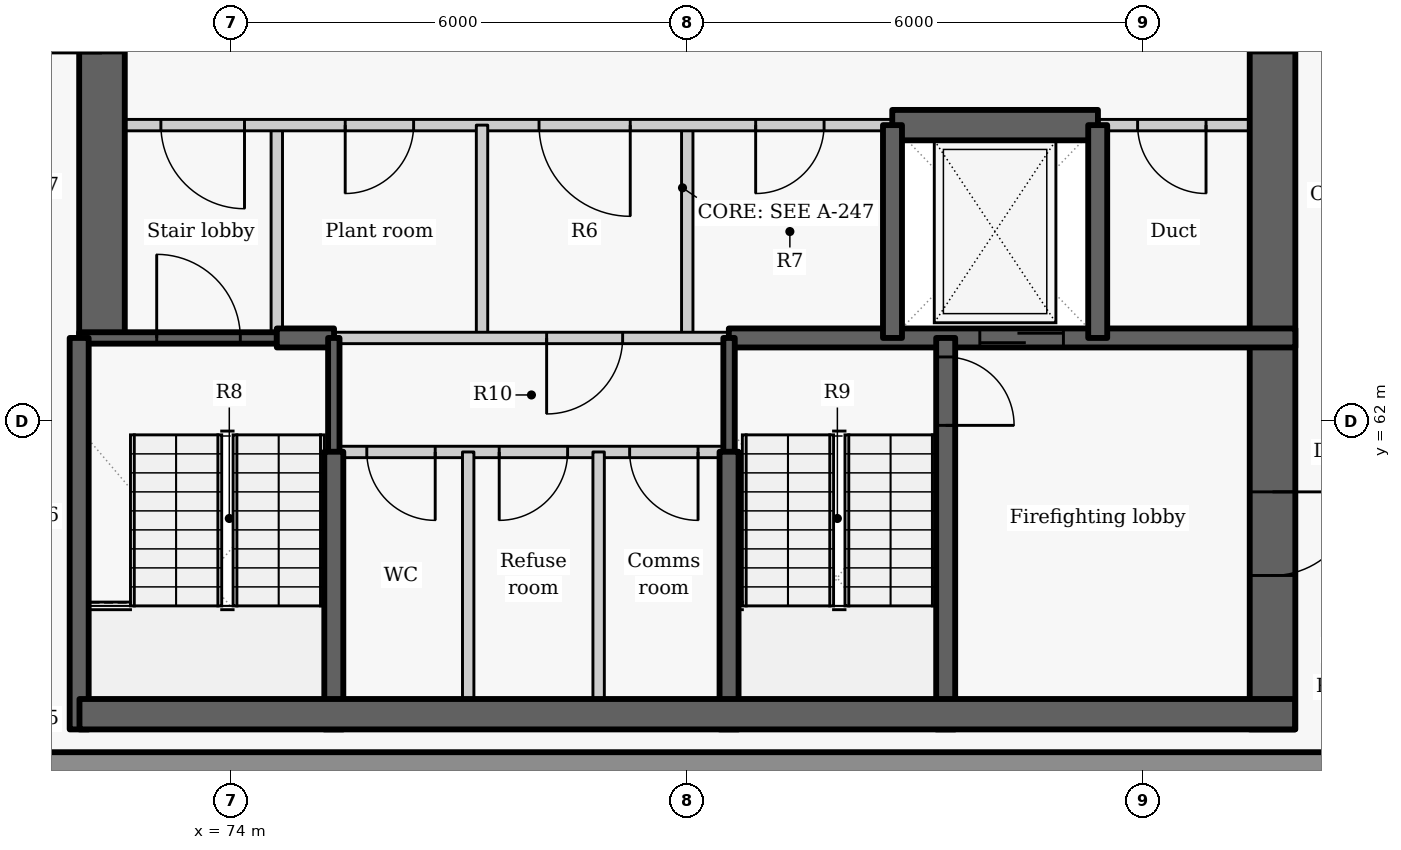
"""IFC4 building model, lengths in metres.
Left out: names, types, materials, properties, quantities, classifications, styles, units other than length and angle.
Written with IfcOpenShell. Run it as: python <this file> out.ifc"""

import sys

from ifc_helpers import new_model, si_unit, direction, frame, frame_2d, origin, place, context, subcontext, project, spatial, rectangle, extrude, element, fill, save


model = new_model("IFC4")
c1 = context("Model", 3, precision=1e-05, world=origin(), true_north=direction((0.0, 1.0)))
c2 = subcontext(c1, "Body", "Model", "MODEL_VIEW")
j1 = project(units=[si_unit("LENGTHUNIT", "METRE"), si_unit("PLANEANGLEUNIT", "RADIAN")], contexts=[c1])
p1 = place(None, origin())
s1 = spatial("IfcSite", under=j1, at=p1, CompositionType="ELEMENT")
p2 = place(p1, origin())
s2 = spatial("IfcBuilding", under=s1, at=p2, CompositionType="ELEMENT")
p3 = place(p2, frame((0.0, 0.0, 279.6)))
s3 = spatial("IfcBuildingStorey", under=s2, at=p3, CompositionType="ELEMENT", Elevation=279.6)
p4 = place(p3, frame((70.451, 57.5, 0.0), z_axis=(0.0, 0.0, 1.0), x_axis=(1.0, 0.0, 0.0)))
e1 = element("IfcWall", 1, at=p4, inside=s3, PredefinedType="SOLIDWALL", context=c2, shape_type="SweptSolid", body=[
    extrude(rectangle(XDim=19.093, YDim=0.3, at=frame_2d((9.546, 0.0))), origin(), (0.0, 0.0, 1.0), 2.725),
])
p5 = place(p3, frame((74.6, 63.1, 0.0), z_axis=(0.0, 0.0, 1.0), x_axis=(0.0, 1.0, 0.0)))
e2 = element("IfcWall", 2, at=p5, inside=s3, PredefinedType="PARTITIONING", context=c2, shape_type="SweptSolid", body=[
    extrude(rectangle(XDim=2.8, YDim=0.15, at=frame_2d((1.4, 0.0))), origin(), (0.0, 0.0, 1.0), 3.325),
])
p6 = place(p3, frame((72.3, 63.1, -0.275), z_axis=(0.0, 0.0, 1.0), x_axis=(0.0, 1.0, 0.0)))
e3 = element("IfcWall", 3, at=p6, inside=s3, PredefinedType="SHEAR", context=c2, shape_type="SweptSolid", body=[
    extrude(rectangle(XDim=9.1, YDim=0.6, at=frame_2d((4.55, 0.0))), origin(), (0.0, 0.0, 1.0), 3.6),
])
p7 = place(p6, frame((3.75, 0.0, 0.275)))
e4 = element("IfcOpeningElement", 4, at=p7, cuts=e3, PredefinedType="OPENING", context=c2, shape_type="SweptSolid", body=[
    extrude(rectangle(XDim=1.5, YDim=2.1, at=frame_2d((0.75, 1.05))), frame((0.0, 0.31, 0.0), z_axis=(0.0, -1.0, 0.0), x_axis=(1.0, 0.0, 0.0)), (0.0, 0.0, 1.0), 0.62),
])
p8 = place(p3, frame((80.0, 63.1, 0.0), z_axis=(0.0, 0.0, 1.0), x_axis=(0.0, 1.0, 0.0)))
e5 = element("IfcWall", 5, at=p8, inside=s3, PredefinedType="PARTITIONING", context=c2, shape_type="SweptSolid", body=[
    extrude(rectangle(XDim=2.8, YDim=0.15, at=frame_2d((1.4, 0.0))), origin(), (0.0, 0.0, 1.0), 3.325),
])
p9 = place(p3, frame((82.703, 65.9, 0.0), z_axis=(0.0, 0.0, 1.0), x_axis=(-1.0, 0.0, 0.0)))
e6 = element("IfcWall", 6, at=p9, inside=s3, PredefinedType="PARTITIONING", context=c2, shape_type="SweptSolid", body=[
    extrude(rectangle(XDim=10.703, YDim=0.15, at=frame_2d((5.352, 0.0))), origin(), (0.0, 0.0, 1.0), 3.325),
])
p10 = place(p9, frame((8.528, 0.0, 0.0)))
e7 = element("IfcOpeningElement", 7, at=p10, cuts=e6, PredefinedType="OPENING", context=c2, shape_type="SweptSolid", body=[
    extrude(rectangle(XDim=1.1, YDim=2.1, at=frame_2d((0.55, 1.05))), frame((0.0, 0.085, 0.0), z_axis=(0.0, -1.0, 0.0), x_axis=(1.0, 0.0, 0.0)), (0.0, 0.0, 1.0), 0.17),
])
p11 = place(p9, frame((6.303, 0.0, 0.0)))
e8 = element("IfcOpeningElement", 8, at=p11, cuts=e6, PredefinedType="OPENING", context=c2, shape_type="SweptSolid", body=[
    extrude(rectangle(XDim=0.9, YDim=2.1, at=frame_2d((0.45, 1.05))), frame((0.0, 0.085, 0.0), z_axis=(0.0, -1.0, 0.0), x_axis=(1.0, 0.0, 0.0)), (0.0, 0.0, 1.0), 0.17),
])
p12 = place(p9, frame((3.453, 0.0, 0.0)))
e9 = element("IfcOpeningElement", 9, at=p12, cuts=e6, PredefinedType="OPENING", context=c2, shape_type="SweptSolid", body=[
    extrude(rectangle(XDim=1.2, YDim=2.1, at=frame_2d((0.6, 1.05))), frame((0.0, 0.085, 0.0), z_axis=(0.0, -1.0, 0.0), x_axis=(1.0, 0.0, 0.0)), (0.0, 0.0, 1.0), 0.17),
])
p13 = place(p9, frame((0.903, 0.0, 0.0)))
e10 = element("IfcOpeningElement", 10, at=p13, cuts=e6, PredefinedType="OPENING", context=c2, shape_type="SweptSolid", body=[
    extrude(rectangle(XDim=0.9, YDim=2.1, at=frame_2d((0.45, 1.05))), frame((0.0, 0.085, 0.0), z_axis=(0.0, -1.0, 0.0), x_axis=(1.0, 0.0, 0.0)), (0.0, 0.0, 1.0), 0.17),
])
p14 = place(p3, frame((88.0, 65.9, 0.0), z_axis=(0.0, 0.0, 1.0), x_axis=(-1.0, 0.0, 0.0)))
e11 = element("IfcWall", 11, at=p14, inside=s3, PredefinedType="PARTITIONING", context=c2, shape_type="SweptSolid", body=[
    extrude(rectangle(XDim=2.603, YDim=0.15, at=frame_2d((1.302, 0.0))), origin(), (0.0, 0.0, 1.0), 3.325),
])
p15 = place(p14, frame((1.175, 0.0, 0.0)))
e12 = element("IfcOpeningElement", 12, at=p15, cuts=e11, PredefinedType="OPENING", context=c2, shape_type="SweptSolid", body=[
    extrude(rectangle(XDim=0.9, YDim=2.1, at=frame_2d((0.45, 1.05))), frame((0.0, 0.085, 0.0), z_axis=(0.0, -1.0, 0.0), x_axis=(1.0, 0.0, 0.0)), (0.0, 0.0, 1.0), 0.17),
])
p16 = place(p3, frame((82.697, 65.9, -0.275), z_axis=(0.0, 0.0, 1.0), x_axis=(1.0, 0.0, 0.0)))
e13 = element("IfcWall", 13, at=p16, inside=s3, PredefinedType="SHEAR", context=c2, shape_type="SweptSolid", body=[
    extrude(rectangle(XDim=2.706, YDim=0.4, at=frame_2d((1.353, 0.0))), origin(), (0.0, 0.0, 1.0), 3.6),
])
p17 = place(p3, frame((87.7, 69.3, -0.275), z_axis=(0.0, 0.0, 1.0), x_axis=(0.0, -1.0, 0.0)))
e14 = element("IfcWall", 14, at=p17, inside=s3, PredefinedType="SHEAR", context=c2, shape_type="SweptSolid", body=[
    extrude(rectangle(XDim=11.35, YDim=0.6, at=frame_2d((5.675, 0.0))), origin(), (0.0, 0.0, 1.0), 3.6),
])
p18 = place(p17, frame((0.95, 0.0, 0.275)))
e15 = element("IfcOpeningElement", 15, at=p18, cuts=e14, PredefinedType="OPENING", context=c2, shape_type="SweptSolid", body=[
    extrude(rectangle(XDim=1.5, YDim=2.1, at=frame_2d((0.75, 1.05))), frame((0.0, 0.31, 0.0), z_axis=(0.0, -1.0, 0.0), x_axis=(1.0, 0.0, 0.0)), (0.0, 0.0, 1.0), 0.62),
])
p19 = place(p17, frame((8.225, 0.0, 0.275)))
e16 = element("IfcOpeningElement", 16, at=p19, cuts=e14, PredefinedType="OPENING", context=c2, shape_type="SweptSolid", body=[
    extrude(rectangle(XDim=1.1, YDim=2.1, at=frame_2d((0.55, 1.05))), frame((0.0, 0.31, 0.0), z_axis=(0.0, -1.0, 0.0), x_axis=(1.0, 0.0, 0.0)), (0.0, 0.0, 1.0), 0.62),
])
p20 = place(p3, frame((72.0, 63.1, -0.275), z_axis=(0.0, 0.0, 1.0), x_axis=(1.0, 0.0, 0.0)))
e17 = element("IfcWall", 17, at=p20, inside=s3, PredefinedType="SHEAR", context=c2, shape_type="SweptSolid", body=[
    extrude(rectangle(XDim=2.6, YDim=0.15, at=frame_2d((1.3, 0.0))), origin(), (0.0, 0.0, 1.0), 3.6),
])
p21 = place(p20, frame((1.02, 0.0, 0.275)))
e18 = element("IfcOpeningElement", 18, at=p21, cuts=e17, PredefinedType="OPENING", context=c2, shape_type="SweptSolid", body=[
    extrude(rectangle(XDim=1.1, YDim=2.1, at=frame_2d((0.55, 1.05))), frame((0.0, 0.085, 0.0), z_axis=(0.0, -1.0, 0.0), x_axis=(1.0, 0.0, 0.0)), (0.0, 0.0, 1.0), 0.17),
])
p22 = place(p3, frame((77.3, 63.1, 0.0), z_axis=(0.0, 0.0, 1.0), x_axis=(0.0, 1.0, 0.0)))
e19 = element("IfcWall", 19, at=p22, inside=s3, PredefinedType="PARTITIONING", context=c2, shape_type="SweptSolid", body=[
    extrude(rectangle(XDim=2.8, YDim=0.15, at=frame_2d((1.4, 0.0))), origin(), (0.0, 0.0, 1.0), 3.325),
])
p23 = place(p3, frame((74.6, 63.1, -0.275), z_axis=(0.0, 0.0, 1.0), x_axis=(1.0, 0.0, 0.0)))
e20 = element("IfcWall", 20, at=p23, inside=s3, PredefinedType="SHEAR", context=c2, shape_type="SweptSolid", body=[
    extrude(rectangle(XDim=0.753, YDim=0.25, at=frame_2d((0.376, 0.0))), origin(), (0.0, 0.0, 1.0), 3.6),
])
p24 = place(p3, frame((80.547, 63.1, -0.275), z_axis=(0.0, 0.0, 1.0), x_axis=(1.0, 0.0, 0.0)))
e21 = element("IfcWall", 21, at=p24, inside=s3, PredefinedType="SHEAR", context=c2, shape_type="SweptSolid", body=[
    extrude(rectangle(XDim=7.453, YDim=0.25, at=frame_2d((3.727, 0.0))), origin(), (0.0, 0.0, 1.0), 3.6),
])
p25 = place(p24, frame((3.302, 0.0, 0.275)))
e22 = element("IfcOpeningElement", 22, at=p25, cuts=e21, PredefinedType="OPENING", context=c2, shape_type="SweptSolid", body=[
    extrude(rectangle(XDim=1.1, YDim=2.1, at=frame_2d((0.55, 1.05))), frame((0.0, 0.135, 0.0), z_axis=(0.0, -1.0, 0.0), x_axis=(1.0, 0.0, 0.0)), (0.0, 0.0, 1.0), 0.27),
])
p26 = place(p3, frame((80.553, 63.1, 0.0), z_axis=(0.0, 0.0, 1.0), x_axis=(-1.0, 0.0, 0.0)))
e23 = element("IfcWall", 23, at=p26, inside=s3, PredefinedType="PARTITIONING", context=c2, shape_type="SweptSolid", body=[
    extrude(rectangle(XDim=5.206, YDim=0.15, at=frame_2d((2.603, 0.0))), origin(), (0.0, 0.0, 1.0), 3.325),
])
p27 = place(p26, frame((1.403, 0.0, 0.0)))
e24 = element("IfcOpeningElement", 24, at=p27, cuts=e23, PredefinedType="OPENING", context=c2, shape_type="SweptSolid", body=[
    extrude(rectangle(XDim=1.0, YDim=2.1, at=frame_2d((0.5, 1.05))), frame((0.0, 0.085, 0.0), z_axis=(0.0, -1.0, 0.0), x_axis=(1.0, 0.0, 0.0)), (0.0, 0.0, 1.0), 0.17),
])
for number, where, z_axis, x_axis in (
    (25, (82.7, 63.1, -0.275), (0.0, 0.0, 1.0), (0.0, 1.0, 0.0)),
    (26, (85.4, 63.1, -0.275), (0.0, 0.0, 1.0), (0.0, 1.0, 0.0)),
):
    element("IfcWall", number, at=place(p3, frame(where, z_axis=z_axis, x_axis=x_axis)), inside=s3, PredefinedType="SHEAR", context=c2, shape_type="SweptSolid", body=[
        extrude(rectangle(XDim=2.8, YDim=0.25, at=frame_2d((1.4, 0.0))), origin(), (0.0, 0.0, 1.0), 3.6),
    ])
p28 = place(p3, frame((75.35, 61.597, -0.275), z_axis=(0.0, 0.0, 1.0), x_axis=(0.0, 1.0, 0.0)))
e27 = element("IfcWall", 27, at=p28, inside=s3, PredefinedType="SHEAR", context=c2, shape_type="SweptSolid", body=[
    extrude(rectangle(XDim=1.503, YDim=0.15, at=frame_2d((0.751, 0.0))), origin(), (0.0, 0.0, 1.0), 3.6),
])
p29 = place(p3, frame((75.35, 57.95, -0.275), z_axis=(0.0, 0.0, 1.0), x_axis=(0.0, 1.0, 0.0)))
e28 = element("IfcWall", 28, at=p29, inside=s3, PredefinedType="SHEAR", context=c2, shape_type="SweptSolid", body=[
    extrude(rectangle(XDim=3.653, YDim=0.25, at=frame_2d((1.827, 0.0))), origin(), (0.0, 0.0, 1.0), 3.6),
])
p30 = place(p3, frame((72.0, 57.95, -0.275), z_axis=(0.0, 0.0, 1.0), x_axis=(0.0, 1.0, 0.0)))
e29 = element("IfcWall", 29, at=p30, inside=s3, PredefinedType="SHEAR", context=c2, shape_type="SweptSolid", body=[
    extrude(rectangle(XDim=5.15, YDim=0.25, at=frame_2d((2.575, 0.0))), origin(), (0.0, 0.0, 1.0), 3.6),
])
p31 = place(p3, frame((83.4, 63.1, -0.275), z_axis=(0.0, 0.0, 1.0), x_axis=(0.0, -1.0, 0.0)))
e30 = element("IfcWall", 30, at=p31, inside=s3, PredefinedType="SHEAR", context=c2, shape_type="SweptSolid", body=[
    extrude(rectangle(XDim=5.15, YDim=0.25, at=frame_2d((2.575, 0.0))), origin(), (0.0, 0.0, 1.0), 3.6),
])
p32 = place(p31, frame((0.25, 0.0, 0.275)))
e31 = element("IfcOpeningElement", 31, at=p32, cuts=e30, PredefinedType="OPENING", context=c2, shape_type="SweptSolid", body=[
    extrude(rectangle(XDim=0.9, YDim=2.1, at=frame_2d((0.45, 1.05))), frame((0.0, 0.135, 0.0), z_axis=(0.0, -1.0, 0.0), x_axis=(1.0, 0.0, 0.0)), (0.0, 0.0, 1.0), 0.27),
])
p33 = place(p3, frame((80.55, 61.597, -0.275), z_axis=(0.0, 0.0, 1.0), x_axis=(0.0, 1.0, 0.0)))
e32 = element("IfcWall", 32, at=p33, inside=s3, PredefinedType="SHEAR", context=c2, shape_type="SweptSolid", body=[
    extrude(rectangle(XDim=1.503, YDim=0.15, at=frame_2d((0.751, 0.0))), origin(), (0.0, 0.0, 1.0), 3.6),
])
p34 = place(p3, frame((80.55, 57.95, -0.275), z_axis=(0.0, 0.0, 1.0), x_axis=(0.0, 1.0, 0.0)))
e33 = element("IfcWall", 33, at=p34, inside=s3, PredefinedType="SHEAR", context=c2, shape_type="SweptSolid", body=[
    extrude(rectangle(XDim=3.653, YDim=0.25, at=frame_2d((1.827, 0.0))), origin(), (0.0, 0.0, 1.0), 3.6),
])
p35 = place(p3, frame((80.55, 61.6, 0.0), z_axis=(0.0, 0.0, 1.0), x_axis=(-1.0, 0.0, 0.0)))
e34 = element("IfcWall", 34, at=p35, inside=s3, PredefinedType="PARTITIONING", context=c2, shape_type="SweptSolid", body=[
    extrude(rectangle(XDim=5.2, YDim=0.15, at=frame_2d((2.6, 0.0))), origin(), (0.0, 0.0, 1.0), 3.325),
])
p36 = place(p35, frame((3.866, 0.0, 0.0)))
e35 = element("IfcOpeningElement", 35, at=p36, cuts=e34, PredefinedType="OPENING", context=c2, shape_type="SweptSolid", body=[
    extrude(rectangle(XDim=0.9, YDim=2.1, at=frame_2d((0.45, 1.05))), frame((0.0, 0.085, 0.0), z_axis=(0.0, -1.0, 0.0), x_axis=(1.0, 0.0, 0.0)), (0.0, 0.0, 1.0), 0.17),
])
p37 = place(p35, frame((2.124, 0.0, 0.0)))
e36 = element("IfcOpeningElement", 36, at=p37, cuts=e34, PredefinedType="OPENING", context=c2, shape_type="SweptSolid", body=[
    extrude(rectangle(XDim=0.9, YDim=2.1, at=frame_2d((0.45, 1.05))), frame((0.0, 0.085, 0.0), z_axis=(0.0, -1.0, 0.0), x_axis=(1.0, 0.0, 0.0)), (0.0, 0.0, 1.0), 0.17),
])
p38 = place(p35, frame((0.408, 0.0, 0.0)))
e37 = element("IfcOpeningElement", 37, at=p38, cuts=e34, PredefinedType="OPENING", context=c2, shape_type="SweptSolid", body=[
    extrude(rectangle(XDim=0.9, YDim=2.1, at=frame_2d((0.45, 1.05))), frame((0.0, 0.085, 0.0), z_axis=(0.0, -1.0, 0.0), x_axis=(1.0, 0.0, 0.0)), (0.0, 0.0, 1.0), 0.17),
])
for number, where, z_axis, x_axis in (
    (38, (77.118, 57.95, 0.0), (0.0, 0.0, 1.0), (0.0, 1.0, 0.0)),
    (39, (78.834, 57.95, 0.0), (0.0, 0.0, 1.0), (0.0, 1.0, 0.0)),
):
    element("IfcWall", number, at=place(p3, frame(where, z_axis=z_axis, x_axis=x_axis)), inside=s3, PredefinedType="PARTITIONING", context=c2, shape_type="SweptSolid", body=[
        extrude(rectangle(XDim=3.65, YDim=0.15, at=frame_2d((1.825, 0.0))), origin(), (0.0, 0.0, 1.0), 3.325),
    ])
p39 = place(p3, frame((72.004, 58.15, -0.275), z_axis=(0.0, 0.0, 1.0), x_axis=(1.0, 0.0, 0.0)))
e40 = element("IfcWall", 40, at=p39, inside=s3, PredefinedType="SHEAR", context=c2, shape_type="SweptSolid", body=[
    extrude(rectangle(XDim=15.992, YDim=0.4, at=frame_2d((7.996, 0.0))), origin(), (0.0, 0.0, 1.0), 3.6),
])
p40 = place(p10, origin())
e41 = element("IfcDoor", 41, at=p40, inside=s3, OperationType="SINGLE_SWING_LEFT", PredefinedType="DOOR", context=c2, shape_type="SweptSolid", body=[
    extrude(rectangle(XDim=1.1, YDim=2.1, at=frame_2d((0.55, 1.05))), frame((0.0, 0.025, 0.0), z_axis=(0.0, -1.0, 0.0), x_axis=(1.0, 0.0, 0.0)), (0.0, 0.0, 1.0), 0.05),
])
fill(e7, e41)
p41 = place(p11, origin())
e42 = element("IfcDoor", 42, at=p41, inside=s3, OperationType="SINGLE_SWING_RIGHT", PredefinedType="DOOR", context=c2, shape_type="SweptSolid", body=[
    extrude(rectangle(XDim=0.9, YDim=2.1, at=frame_2d((0.45, 1.05))), frame((0.0, 0.025, 0.0), z_axis=(0.0, -1.0, 0.0), x_axis=(1.0, 0.0, 0.0)), (0.0, 0.0, 1.0), 0.05),
])
fill(e8, e42)
p42 = place(p12, origin())
e43 = element("IfcDoor", 43, at=p42, inside=s3, OperationType="DOUBLE_DOOR_SINGLE_SWING", PredefinedType="DOOR", context=c2, shape_type="SweptSolid", body=[
    extrude(rectangle(XDim=1.2, YDim=2.1, at=frame_2d((0.6, 1.05))), frame((0.0, 0.025, 0.0), z_axis=(0.0, -1.0, 0.0), x_axis=(1.0, 0.0, 0.0)), (0.0, 0.0, 1.0), 0.05),
])
fill(e9, e43)
p43 = place(p13, origin())
e44 = element("IfcDoor", 44, at=p43, inside=s3, OperationType="SINGLE_SWING_RIGHT", PredefinedType="DOOR", context=c2, shape_type="SweptSolid", body=[
    extrude(rectangle(XDim=0.9, YDim=2.1, at=frame_2d((0.45, 1.05))), frame((0.0, 0.025, 0.0), z_axis=(0.0, -1.0, 0.0), x_axis=(1.0, 0.0, 0.0)), (0.0, 0.0, 1.0), 0.05),
])
fill(e10, e44)
p44 = place(p25, origin())
e45 = element("IfcDoor", 45, at=p44, inside=s3, OperationType="SLIDING_TO_LEFT", PredefinedType="DOOR", context=c2, shape_type="SweptSolid", body=[
    extrude(rectangle(XDim=1.1, YDim=2.1, at=frame_2d((0.55, 1.05))), frame((0.0, 0.025, 0.0), z_axis=(0.0, -1.0, 0.0), x_axis=(1.0, 0.0, 0.0)), (0.0, 0.0, 1.0), 0.05),
])
fill(e22, e45)
p45 = place(p15, origin())
e46 = element("IfcDoor", 46, at=p45, inside=s3, OperationType="SINGLE_SWING_LEFT", PredefinedType="DOOR", context=c2, shape_type="SweptSolid", body=[
    extrude(rectangle(XDim=0.9, YDim=2.1, at=frame_2d((0.45, 1.05))), frame((0.0, 0.025, 0.0), z_axis=(0.0, -1.0, 0.0), x_axis=(1.0, 0.0, 0.0)), (0.0, 0.0, 1.0), 0.05),
])
fill(e12, e46)
p46 = place(p27, origin())
e47 = element("IfcDoor", 47, at=p46, inside=s3, OperationType="SINGLE_SWING_RIGHT", PredefinedType="DOOR", context=c2, shape_type="SweptSolid", body=[
    extrude(rectangle(XDim=1.0, YDim=2.1, at=frame_2d((0.5, 1.05))), frame((0.0, 0.025, 0.0), z_axis=(0.0, -1.0, 0.0), x_axis=(1.0, 0.0, 0.0)), (0.0, 0.0, 1.0), 0.05),
])
fill(e24, e47)
p47 = place(p36, origin())
e48 = element("IfcDoor", 48, at=p47, inside=s3, OperationType="SINGLE_SWING_LEFT", PredefinedType="DOOR", context=c2, shape_type="SweptSolid", body=[
    extrude(rectangle(XDim=0.9, YDim=2.1, at=frame_2d((0.45, 1.05))), frame((0.0, 0.025, 0.0), z_axis=(0.0, -1.0, 0.0), x_axis=(1.0, 0.0, 0.0)), (0.0, 0.0, 1.0), 0.05),
])
fill(e35, e48)
p48 = place(p37, origin())
e49 = element("IfcDoor", 49, at=p48, inside=s3, OperationType="SINGLE_SWING_RIGHT", PredefinedType="DOOR", context=c2, shape_type="SweptSolid", body=[
    extrude(rectangle(XDim=0.9, YDim=2.1, at=frame_2d((0.45, 1.05))), frame((0.0, 0.025, 0.0), z_axis=(0.0, -1.0, 0.0), x_axis=(1.0, 0.0, 0.0)), (0.0, 0.0, 1.0), 0.05),
])
fill(e36, e49)
p49 = place(p38, origin())
e50 = element("IfcDoor", 50, at=p49, inside=s3, OperationType="SINGLE_SWING_LEFT", PredefinedType="DOOR", context=c2, shape_type="SweptSolid", body=[
    extrude(rectangle(XDim=0.9, YDim=2.1, at=frame_2d((0.45, 1.05))), frame((0.0, 0.025, 0.0), z_axis=(0.0, -1.0, 0.0), x_axis=(1.0, 0.0, 0.0)), (0.0, 0.0, 1.0), 0.05),
])
fill(e37, e50)
p50 = place(p21, origin())
e51 = element("IfcDoor", 51, at=p50, inside=s3, OperationType="SINGLE_SWING_LEFT", PredefinedType="DOOR", context=c2, shape_type="SweptSolid", body=[
    extrude(rectangle(XDim=1.1, YDim=2.1, at=frame_2d((0.55, 1.05))), frame((0.0, 0.025, 0.0), z_axis=(0.0, -1.0, 0.0), x_axis=(1.0, 0.0, 0.0)), (0.0, 0.0, 1.0), 0.05),
])
fill(e18, e51)
p51 = place(p32, origin())
e52 = element("IfcDoor", 52, at=p51, inside=s3, OperationType="SINGLE_SWING_RIGHT", PredefinedType="DOOR", context=c2, shape_type="SweptSolid", body=[
    extrude(rectangle(XDim=0.9, YDim=2.1, at=frame_2d((0.45, 1.05))), frame((0.0, 0.025, 0.0), z_axis=(0.0, -1.0, 0.0), x_axis=(1.0, 0.0, 0.0)), (0.0, 0.0, 1.0), 0.05),
])
fill(e31, e52)
p52 = place(p19, origin())
e53 = element("IfcDoor", 53, at=p52, inside=s3, OperationType="SINGLE_SWING_LEFT", PredefinedType="DOOR", context=c2, shape_type="SweptSolid", body=[
    extrude(rectangle(XDim=1.1, YDim=2.1, at=frame_2d((0.55, 1.05))), frame((0.0, 0.025, 0.0), z_axis=(0.0, -1.0, 0.0), x_axis=(1.0, 0.0, 0.0)), (0.0, 0.0, 1.0), 0.05),
])
fill(e16, e53)
save(model, sys.argv[1])
